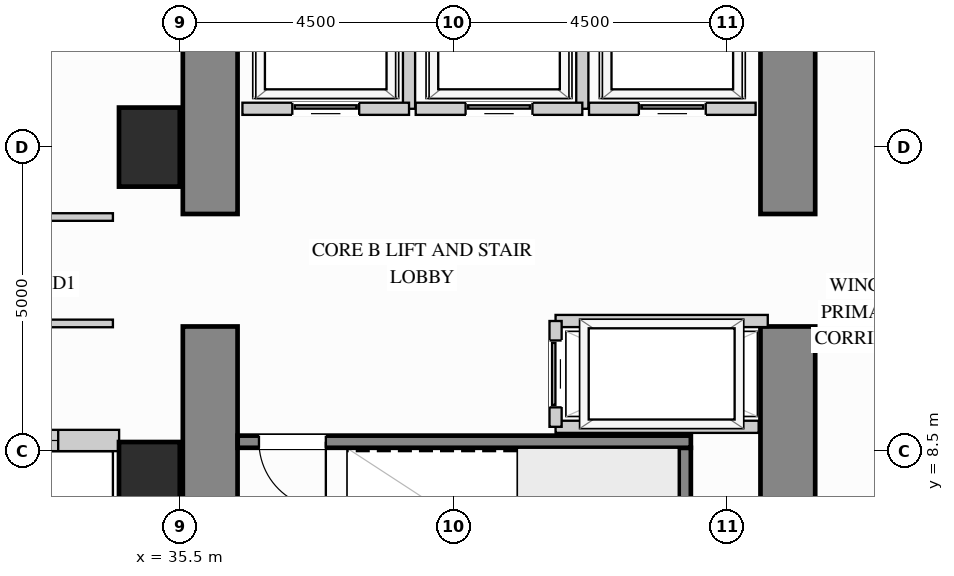
"""IFC4 building model, lengths in metres.
Left out: names, types, materials, properties, quantities, classifications, styles, units other than length and angle.
Written with IfcOpenShell. Run it as: python <this file> out.ifc"""

import sys

from ifc_helpers import new_model, si_unit, direction, frame, frame_2d, origin, origin_2d, place, context, subcontext, project, spatial, rectangle, extrude, source, transform, mapped, element, fill, save


model = new_model("IFC4")
c1 = context("Model", 3, precision=1e-05, world=origin(), true_north=direction((0.0, 1.0)))
c2 = subcontext(c1, "Body", "Model", "MODEL_VIEW")
j1 = project(units=[si_unit("LENGTHUNIT", "METRE"), si_unit("PLANEANGLEUNIT", "RADIAN")], contexts=[c1])
p1 = place(None, origin())
s1 = spatial("IfcSite", under=j1, at=p1, CompositionType="ELEMENT")
p2 = place(p1, origin())
s2 = spatial("IfcBuilding", under=s1, at=p2, CompositionType="ELEMENT")
p3 = place(p2, frame((0.0, 0.0, 40.5)))
s3 = spatial("IfcBuildingStorey", under=s2, at=p3, CompositionType="ELEMENT", Elevation=40.5)
m1 = source(origin(), c2, "Body", "SweptSolid", [
    extrude(rectangle(XDim=1.0, YDim=1.3, at=origin_2d()), origin(), (0.0, 0.0, 1.0), 3.38),
])
for number, where, z_axis, x_axis in (
    (1, (35.0, 13.5, 0.0), (0.0, 0.0, 1.0), (1.0, 0.0, 0.0)),
    (2, (35.0, 8.0, 0.0), (0.0, 0.0, 1.0), (1.0, 0.0, 0.0)),
):
    element("IfcColumn", number, at=place(p3, frame(where, z_axis=z_axis, x_axis=x_axis)), inside=s3, PredefinedType="COLUMN", context=c2, shape_type="MappedRepresentation", body=[
        mapped(m1, transform((0.0, 0.0, 0.0), x_axis=(1.0, 0.0, 0.0), y_axis=(0.0, 1.0, 0.0), z_axis=(0.0, 0.0, 1.0))),
    ])
m2 = source(origin(), c2, "Body", "SweptSolid", [
    extrude(rectangle(XDim=5.6, YDim=0.9, at=frame_2d((2.8, 0.0))), origin(), (0.0, 0.0, 1.0), 3.38),
])
p4 = place(p3, frame((45.5, 4.95, 0.0), z_axis=(0.0, 0.0, 1.0), x_axis=(0.0, 1.0, 0.0)))
e3 = element("IfcWall", 3, at=p4, inside=s3, PredefinedType="SHEAR", context=c2, shape_type="MappedRepresentation", body=[
    mapped(m2, transform((0.0, 0.0, 0.0), x_axis=(1.0, 0.0, 0.0), y_axis=(0.0, 1.0, 0.0), z_axis=(0.0, 0.0, 1.0))),
])
m3 = source(origin(), c2, "Body", "SweptSolid", [
    extrude(rectangle(XDim=3.65, YDim=0.9, at=frame_2d((1.825, 0.0))), origin(), (0.0, 0.0, 1.0), 3.38),
])
p5 = place(p3, frame((45.5, 12.4, 0.0), z_axis=(0.0, 0.0, 1.0), x_axis=(0.0, 1.0, 0.0)))
e4 = element("IfcWall", 4, at=p5, inside=s3, PredefinedType="SHEAR", context=c2, shape_type="MappedRepresentation", body=[
    mapped(m3, transform((0.0, 0.0, 0.0), x_axis=(1.0, 0.0, 0.0), y_axis=(0.0, 1.0, 0.0), z_axis=(0.0, 0.0, 1.0))),
])
p6 = place(p3, frame((36.0, 4.95, 0.0), z_axis=(0.0, 0.0, 1.0), x_axis=(0.0, 1.0, 0.0)))
e5 = element("IfcWall", 5, at=p6, inside=s3, PredefinedType="SHEAR", context=c2, shape_type="MappedRepresentation", body=[
    mapped(m2, transform((0.0, 0.0, 0.0), x_axis=(1.0, 0.0, 0.0), y_axis=(0.0, 1.0, 0.0), z_axis=(0.0, 0.0, 1.0))),
])
p7 = place(p3, frame((36.0, 12.4, 0.0), z_axis=(0.0, 0.0, 1.0), x_axis=(0.0, 1.0, 0.0)))
e6 = element("IfcWall", 6, at=p7, inside=s3, PredefinedType="SHEAR", context=c2, shape_type="MappedRepresentation", body=[
    mapped(m3, transform((0.0, 0.0, 0.0), x_axis=(1.0, 0.0, 0.0), y_axis=(0.0, 1.0, 0.0), z_axis=(0.0, 0.0, 1.0))),
])
p8 = place(p3, frame((30.998, 8.675, 0.0), z_axis=(0.0, 0.0, 1.0), x_axis=(1.0, 0.0, 0.0)))
e7 = element("IfcWall", 7, at=p8, inside=s3, PredefinedType="SOLIDWALL", context=c2, shape_type="SweptSolid", body=[
    extrude(rectangle(XDim=3.504, YDim=0.35, at=frame_2d((1.752, 0.0))), origin(), (0.0, 0.0, 1.0), 3.365),
])
p9 = place(p8, frame((1.002, 0.0, 0.78)))
e8 = element("IfcOpeningElement", 8, at=p9, cuts=e7, PredefinedType="OPENING", context=c2, shape_type="SweptSolid", body=[
    extrude(rectangle(XDim=1.5, YDim=2.0, at=frame_2d((0.75, 1.0))), frame((0.0, 0.185, 0.0), z_axis=(0.0, -1.0, 0.0), x_axis=(1.0, 0.0, 0.0)), (0.0, 0.0, 1.0), 0.37),
])
p10 = place(p3, frame((29.85, 12.35, 0.0), z_axis=(0.0, 0.0, 1.0), x_axis=(1.0, 0.0, 0.0)))
e9 = element("IfcWall", 9, at=p10, inside=s3, PredefinedType="PARTITIONING", context=c2, shape_type="SweptSolid", body=[
    extrude(rectangle(XDim=4.55, YDim=0.125, at=frame_2d((2.275, 0.0))), origin(), (0.0, 0.0, 1.0), 3.365),
])
p11 = place(p10, frame((1.8, 0.0, 0.0)))
e10 = element("IfcOpeningElement", 10, at=p11, cuts=e9, PredefinedType="OPENING", context=c2, shape_type="SweptSolid", body=[
    extrude(rectangle(XDim=0.95, YDim=2.15, at=frame_2d((0.475, 1.075))), frame((0.0, 0.073, 0.0), z_axis=(0.0, -1.0, 0.0), x_axis=(1.0, 0.0, 0.0)), (0.0, 0.0, 1.0), 0.145),
])
p12 = place(p3, frame((26.95, 10.6, 0.0), z_axis=(0.0, 0.0, 1.0), x_axis=(1.0, 0.0, 0.0)))
e11 = element("IfcWall", 11, at=p12, inside=s3, PredefinedType="PARTITIONING", context=c2, shape_type="SweptSolid", body=[
    extrude(rectangle(XDim=7.45, YDim=0.125, at=frame_2d((3.725, 0.0))), origin(), (0.0, 0.0, 1.0), 3.365),
])
p13 = place(p12, frame((4.683, 0.0, 0.0)))
e12 = element("IfcOpeningElement", 12, at=p13, cuts=e11, PredefinedType="OPENING", context=c2, shape_type="SweptSolid", body=[
    extrude(rectangle(XDim=0.95, YDim=2.15, at=frame_2d((0.475, 1.075))), frame((0.0, 0.073, 0.0), z_axis=(0.0, -1.0, 0.0), x_axis=(1.0, 0.0, 0.0)), (0.0, 0.0, 1.0), 0.145),
])
m4 = source(origin(), c2, "Body", "SweptSolid", [
    extrude(rectangle(XDim=1.89, YDim=0.2, at=frame_2d((0.945, 0.0))), origin(), (0.0, 0.0, 1.0), 3.365),
])
p14 = place(p3, frame((39.27, 14.13, 0.0), z_axis=(0.0, 0.0, 1.0), x_axis=(0.0, 1.0, 0.0)))
e13 = element("IfcWall", 13, at=p14, inside=s3, PredefinedType="PARTITIONING", context=c2, shape_type="MappedRepresentation", body=[
    mapped(m4, transform((0.0, 0.0, 0.0), x_axis=(1.0, 0.0, 0.0), y_axis=(0.0, 1.0, 0.0), z_axis=(0.0, 0.0, 1.0))),
])
p15 = place(p3, frame((36.53, 14.13, 0.0), z_axis=(0.0, 0.0, 1.0), x_axis=(1.0, 0.0, 0.0)))
e14 = element("IfcWall", 14, at=p15, inside=s3, PredefinedType="PARTITIONING", context=c2, shape_type="SweptSolid", body=[
    extrude(rectangle(XDim=2.74, YDim=0.2, at=frame_2d((1.37, 0.0))), origin(), (0.0, 0.0, 1.0), 3.365),
])
p16 = place(p15, frame((0.82, 0.0, 0.0)))
e15 = element("IfcOpeningElement", 15, at=p16, cuts=e14, PredefinedType="OPENING", context=c2, shape_type="SweptSolid", body=[
    extrude(rectangle(XDim=1.1, YDim=2.2, at=frame_2d((0.55, 1.1))), frame((0.0, 0.11, 0.0), z_axis=(0.0, -1.0, 0.0), x_axis=(1.0, 0.0, 0.0)), (0.0, 0.0, 1.0), 0.22),
])
p17 = place(p3, frame((42.12, 14.13, 0.0), z_axis=(0.0, 0.0, 1.0), x_axis=(0.0, 1.0, 0.0)))
e16 = element("IfcWall", 16, at=p17, inside=s3, PredefinedType="PARTITIONING", context=c2, shape_type="MappedRepresentation", body=[
    mapped(m4, transform((0.0, 0.0, 0.0), x_axis=(1.0, 0.0, 0.0), y_axis=(0.0, 1.0, 0.0), z_axis=(0.0, 0.0, 1.0))),
])
p18 = place(p3, frame((39.38, 14.13, 0.0), z_axis=(0.0, 0.0, 1.0), x_axis=(1.0, 0.0, 0.0)))
e17 = element("IfcWall", 17, at=p18, inside=s3, PredefinedType="PARTITIONING", context=c2, shape_type="SweptSolid", body=[
    extrude(rectangle(XDim=2.74, YDim=0.2, at=frame_2d((1.37, 0.0))), origin(), (0.0, 0.0, 1.0), 3.365),
])
p19 = place(p18, frame((0.82, 0.0, 0.0)))
e18 = element("IfcOpeningElement", 18, at=p19, cuts=e17, PredefinedType="OPENING", context=c2, shape_type="SweptSolid", body=[
    extrude(rectangle(XDim=1.1, YDim=2.2, at=frame_2d((0.55, 1.1))), frame((0.0, 0.11, 0.0), z_axis=(0.0, -1.0, 0.0), x_axis=(1.0, 0.0, 0.0)), (0.0, 0.0, 1.0), 0.22),
])
p20 = place(p3, frame((42.23, 14.13, 0.0), z_axis=(0.0, 0.0, 1.0), x_axis=(1.0, 0.0, 0.0)))
e19 = element("IfcWall", 19, at=p20, inside=s3, PredefinedType="PARTITIONING", context=c2, shape_type="SweptSolid", body=[
    extrude(rectangle(XDim=2.74, YDim=0.2, at=frame_2d((1.37, 0.0))), origin(), (0.0, 0.0, 1.0), 3.365),
])
p21 = place(p20, frame((0.82, 0.0, 0.0)))
e20 = element("IfcOpeningElement", 20, at=p21, cuts=e19, PredefinedType="OPENING", context=c2, shape_type="SweptSolid", body=[
    extrude(rectangle(XDim=1.1, YDim=2.2, at=frame_2d((0.55, 1.1))), frame((0.0, 0.11, 0.0), z_axis=(0.0, -1.0, 0.0), x_axis=(1.0, 0.0, 0.0)), (0.0, 0.0, 1.0), 0.22),
])
m5 = source(origin(), c2, "Body", "SweptSolid", [
    extrude(rectangle(XDim=3.49, YDim=0.2, at=frame_2d((1.745, 0.0))), origin(), (0.0, 0.0, 1.0), 3.365),
])
p22 = place(p3, frame((41.68, 10.64, 0.0), z_axis=(0.0, 0.0, 1.0), x_axis=(1.0, 0.0, 0.0)))
e21 = element("IfcWall", 21, at=p22, inside=s3, PredefinedType="PARTITIONING", context=c2, shape_type="MappedRepresentation", body=[
    mapped(m5, transform((0.0, 0.0, 0.0), x_axis=(1.0, 0.0, 0.0), y_axis=(0.0, 1.0, 0.0), z_axis=(0.0, 0.0, 1.0))),
])
m6 = source(origin(), c2, "Body", "SweptSolid", [
    extrude(rectangle(XDim=3.34, YDim=0.2, at=frame_2d((1.67, 0.0))), origin(), (0.0, 0.0, 1.0), 3.365),
])
p23 = place(p3, frame((41.68, 8.9, 0.0), z_axis=(0.0, 0.0, 1.0), x_axis=(1.0, 0.0, 0.0)))
e22 = element("IfcWall", 22, at=p23, inside=s3, PredefinedType="PARTITIONING", context=c2, shape_type="MappedRepresentation", body=[
    mapped(m6, transform((0.0, 0.0, 0.0), x_axis=(1.0, 0.0, 0.0), y_axis=(0.0, 1.0, 0.0), z_axis=(0.0, 0.0, 1.0))),
])
p24 = place(p3, frame((41.68, 8.9, 0.0), z_axis=(0.0, 0.0, 1.0), x_axis=(0.0, 1.0, 0.0)))
e23 = element("IfcWall", 23, at=p24, inside=s3, PredefinedType="PARTITIONING", context=c2, shape_type="SweptSolid", body=[
    extrude(rectangle(XDim=1.74, YDim=0.2, at=frame_2d((0.87, 0.0))), origin(), (0.0, 0.0, 1.0), 3.365),
])
p25 = place(p24, frame((0.32, 0.0, 0.0)))
e24 = element("IfcOpeningElement", 24, at=p25, cuts=e23, PredefinedType="OPENING", context=c2, shape_type="SweptSolid", body=[
    extrude(rectangle(XDim=1.1, YDim=2.2, at=frame_2d((0.55, 1.1))), frame((0.0, 0.11, 0.0), z_axis=(0.0, -1.0, 0.0), x_axis=(1.0, 0.0, 0.0)), (0.0, 0.0, 1.0), 0.22),
])
m7 = source(origin(), c2, "Body", "SweptSolid", [
    extrude(rectangle(XDim=3.603, YDim=0.2, at=frame_2d((1.802, 0.0))), origin(), (0.0, 0.0, 1.0), 3.38),
])
p26 = place(p3, frame((43.805, 4.952, 0.0), z_axis=(0.0, 0.0, 1.0), x_axis=(0.0, 1.0, 0.0)))
e25 = element("IfcWall", 25, at=p26, inside=s3, PredefinedType="SHEAR", context=c2, shape_type="MappedRepresentation", body=[
    mapped(m7, transform((0.0, 0.0, 0.0), x_axis=(1.0, 0.0, 0.0), y_axis=(0.0, 1.0, 0.0), z_axis=(0.0, 0.0, 1.0))),
])
p27 = place(p3, frame((36.452, 8.655, 0.0), z_axis=(0.0, 0.0, 1.0), x_axis=(1.0, 0.0, 0.0)))
e26 = element("IfcWall", 26, at=p27, inside=s3, PredefinedType="SHEAR", context=c2, shape_type="SweptSolid", body=[
    extrude(rectangle(XDim=7.453, YDim=0.2, at=frame_2d((3.727, 0.0))), origin(), (0.0, 0.0, 1.0), 3.38),
])
p28 = place(p27, frame((0.35, 0.0, 0.0)))
e27 = element("IfcOpeningElement", 27, at=p28, cuts=e26, PredefinedType="OPENING", context=c2, shape_type="SweptSolid", body=[
    extrude(rectangle(XDim=1.1, YDim=2.15, at=frame_2d((0.55, 1.075))), frame((0.0, 0.11, 0.0), z_axis=(0.0, -1.0, 0.0), x_axis=(1.0, 0.0, 0.0)), (0.0, 0.0, 1.0), 0.22),
])
m8 = source(origin(), c2, "Body", "SweptSolid", [
    extrude(rectangle(XDim=1.1, YDim=2.2, at=frame_2d((0.55, 1.1))), frame((0.0, 0.025, 0.0), z_axis=(0.0, -1.0, 0.0), x_axis=(1.0, 0.0, 0.0)), (0.0, 0.0, 1.0), 0.05),
])
p29 = place(p16, origin())
e28 = element("IfcDoor", 28, at=p29, inside=s3, OperationType="SLIDING_TO_LEFT", PredefinedType="DOOR", context=c2, shape_type="MappedRepresentation", body=[
    mapped(m8, transform((0.0, 0.0, 0.0), x_axis=(1.0, 0.0, 0.0), y_axis=(0.0, 1.0, 0.0), z_axis=(0.0, 0.0, 1.0))),
])
fill(e15, e28)
p30 = place(p19, origin())
e29 = element("IfcDoor", 29, at=p30, inside=s3, OperationType="SLIDING_TO_LEFT", PredefinedType="DOOR", context=c2, shape_type="MappedRepresentation", body=[
    mapped(m8, transform((0.0, 0.0, 0.0), x_axis=(1.0, 0.0, 0.0), y_axis=(0.0, 1.0, 0.0), z_axis=(0.0, 0.0, 1.0))),
])
fill(e18, e29)
p31 = place(p21, origin())
e30 = element("IfcDoor", 30, at=p31, inside=s3, OperationType="SLIDING_TO_LEFT", PredefinedType="DOOR", context=c2, shape_type="MappedRepresentation", body=[
    mapped(m8, transform((0.0, 0.0, 0.0), x_axis=(1.0, 0.0, 0.0), y_axis=(0.0, 1.0, 0.0), z_axis=(0.0, 0.0, 1.0))),
])
fill(e20, e30)
p32 = place(p25, origin())
e31 = element("IfcDoor", 31, at=p32, inside=s3, OperationType="SLIDING_TO_LEFT", PredefinedType="DOOR", context=c2, shape_type="MappedRepresentation", body=[
    mapped(m8, transform((0.0, 0.0, 0.0), x_axis=(1.0, 0.0, 0.0), y_axis=(0.0, 1.0, 0.0), z_axis=(0.0, 0.0, 1.0))),
])
fill(e24, e31)
m9 = source(origin(), c2, "Body", "SweptSolid", [
    extrude(rectangle(XDim=1.1, YDim=2.15, at=frame_2d((0.55, 1.075))), frame((0.0, 0.025, 0.0), z_axis=(0.0, -1.0, 0.0), x_axis=(1.0, 0.0, 0.0)), (0.0, 0.0, 1.0), 0.05),
])
p33 = place(p28, origin())
e32 = element("IfcDoor", 32, at=p33, inside=s3, OperationType="SINGLE_SWING_RIGHT", PredefinedType="DOOR", context=c2, shape_type="MappedRepresentation", body=[
    mapped(m9, transform((0.0, 0.0, 0.0), x_axis=(1.0, 0.0, 0.0), y_axis=(0.0, 1.0, 0.0), z_axis=(0.0, 0.0, 1.0))),
])
fill(e27, e32)
m10 = source(origin(), c2, "Body", "SweptSolid", [
    extrude(rectangle(XDim=1.5, YDim=2.0, at=frame_2d((0.75, 1.0))), frame((0.0, 0.03, 0.0), z_axis=(0.0, -1.0, 0.0), x_axis=(1.0, 0.0, 0.0)), (0.0, 0.0, 1.0), 0.06),
])
p34 = place(p9, origin())
e33 = element("IfcWindow", 33, at=p34, inside=s3, PartitioningType="SINGLE_PANEL", PredefinedType="WINDOW", context=c2, shape_type="MappedRepresentation", body=[
    mapped(m10, transform((0.0, 0.0, 0.0), x_axis=(1.0, 0.0, 0.0), y_axis=(0.0, 1.0, 0.0), z_axis=(0.0, 0.0, 1.0))),
])
fill(e8, e33)
save(model, sys.argv[1])
